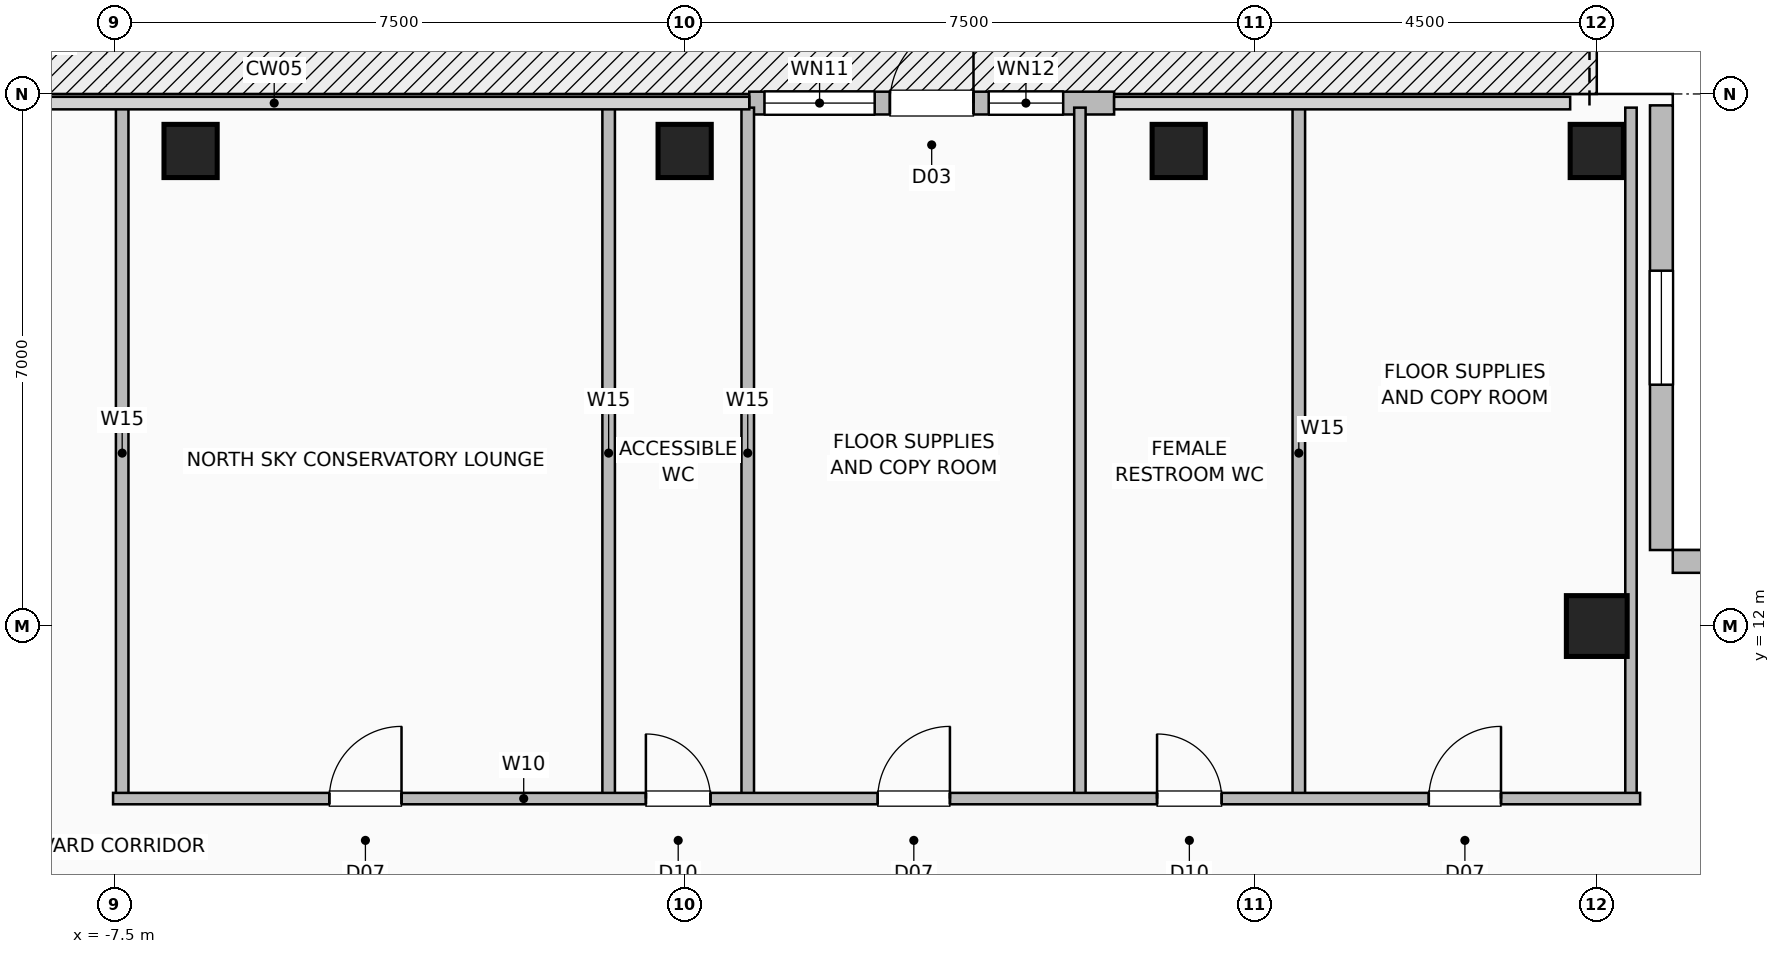
"""IFC4 building model, lengths in metres.
Left out: names, types, materials, properties, quantities, classifications, styles, units other than length and angle.
Written with IfcOpenShell. Run it as: python <this file> out.ifc"""

import sys

from ifc_helpers import new_model, si_unit, direction, frame, frame_2d, origin, origin_2d, place, context, subcontext, project, spatial, rectangle, hollow_rectangle, extrude, element, fill, save


model = new_model("IFC4")
c1 = context("Model", 3, precision=1e-05, world=origin(), true_north=direction((0.0, 1.0)))
c2 = subcontext(c1, "Body", "Model", "MODEL_VIEW")
j1 = project(units=[si_unit("LENGTHUNIT", "METRE"), si_unit("PLANEANGLEUNIT", "RADIAN")], contexts=[c1])
p1 = place(None, origin())
s1 = spatial("IfcSite", under=j1, at=p1, CompositionType="ELEMENT")
p2 = place(p1, origin())
s2 = spatial("IfcBuilding", under=s1, at=p2, CompositionType="ELEMENT")
p3 = place(p2, frame((0.0, 0.0, 264.8)))
s3 = spatial("IfcBuildingStorey", under=s2, at=p3, CompositionType="ELEMENT", Elevation=264.8)
for number, where, z_axis, x_axis in (
    (1, (-6.5, 18.25, 0.0), (0.0, 0.0, 1.0), (1.0, 0.0, 0.0)),
    (2, (0.0, 18.25, 0.0), (0.0, 0.0, 1.0), (1.0, 0.0, 0.0)),
    (3, (6.5, 18.25, 0.0), (0.0, 0.0, 1.0), (1.0, 0.0, 0.0)),
    (4, (12.0, 18.25, 0.0), (0.0, 0.0, 1.0), (1.0, 0.0, 0.0)),
):
    element("IfcColumn", number, at=place(p3, frame(where, z_axis=z_axis, x_axis=x_axis)), inside=s3, PredefinedType="COLUMN", context=c2, shape_type="SweptSolid", body=[
        extrude(hollow_rectangle(XDim=0.7, YDim=0.7, WallThickness=0.035, at=origin_2d()), origin(), (0.0, 0.0, 1.0), 3.6),
    ])
p4 = place(p3, frame((12.0, 12.0, 0.0), z_axis=(0.0, 0.0, 1.0), x_axis=(1.0, 0.0, 0.0)))
e5 = element("IfcColumn", 5, at=p4, inside=s3, PredefinedType="COLUMN", context=c2, shape_type="SweptSolid", body=[
    extrude(hollow_rectangle(XDim=0.8, YDim=0.8, WallThickness=0.04, at=origin_2d()), origin(), (0.0, 0.0, 1.0), 3.6),
])
p5 = place(p3, frame((0.85, 18.88, 0.0), z_axis=(0.0, 0.0, 1.0), x_axis=(1.0, 0.0, 0.0)))
e6 = element("IfcWall", 6, at=p5, inside=s3, PredefinedType="SOLIDWALL", context=c2, shape_type="SweptSolid", body=[
    extrude(rectangle(XDim=4.8, YDim=0.3, at=frame_2d((2.4, 0.0))), origin(), (0.0, 0.0, 1.0), 3.36),
])
p6 = place(p5, frame((1.85, 0.0, 0.0)))
e7 = element("IfcOpeningElement", 7, at=p6, cuts=e6, PredefinedType="OPENING", context=c2, shape_type="SweptSolid", body=[
    extrude(rectangle(XDim=1.1, YDim=2.2, at=frame_2d((0.55, 1.1))), frame((0.0, 0.16, 0.0), z_axis=(0.0, -1.0, 0.0), x_axis=(1.0, 0.0, 0.0)), (0.0, 0.0, 1.0), 0.32),
])
p7 = place(p5, frame((0.2, 0.0, 0.85)))
e8 = element("IfcOpeningElement", 8, at=p7, cuts=e6, PredefinedType="OPENING", context=c2, shape_type="SweptSolid", body=[
    extrude(rectangle(XDim=1.45, YDim=1.8, at=frame_2d((0.725, 0.9))), frame((0.0, 0.16, 0.0), z_axis=(0.0, -1.0, 0.0), x_axis=(1.0, 0.0, 0.0)), (0.0, 0.0, 1.0), 0.32),
])
p8 = place(p5, frame((3.15, 0.0, 0.85)))
e9 = element("IfcOpeningElement", 9, at=p8, cuts=e6, PredefinedType="OPENING", context=c2, shape_type="SweptSolid", body=[
    extrude(rectangle(XDim=0.98, YDim=1.8, at=frame_2d((0.49, 0.9))), frame((0.0, 0.16, 0.0), z_axis=(0.0, -1.0, 0.0), x_axis=(1.0, 0.0, 0.0)), (0.0, 0.0, 1.0), 0.32),
])
p9 = place(p3, frame((12.85, 18.85, 0.0), z_axis=(0.0, 0.0, 1.0), x_axis=(0.0, -1.0, 0.0)))
e10 = element("IfcWall", 10, at=p9, inside=s3, PredefinedType="SOLIDWALL", context=c2, shape_type="SweptSolid", body=[
    extrude(rectangle(XDim=5.85, YDim=0.3, at=frame_2d((2.925, 0.0))), origin(), (0.0, 0.0, 1.0), 3.36),
])
p10 = place(p9, frame((2.175, 0.0, 0.9)))
e11 = element("IfcOpeningElement", 11, at=p10, cuts=e10, PredefinedType="OPENING", context=c2, shape_type="SweptSolid", body=[
    extrude(rectangle(XDim=1.5, YDim=1.8, at=frame_2d((0.75, 0.9))), frame((0.0, 0.16, 0.0), z_axis=(0.0, -1.0, 0.0), x_axis=(1.0, 0.0, 0.0)), (0.0, 0.0, 1.0), 0.32),
])
p11 = place(p3, frame((18.85, 12.85, 0.0), z_axis=(0.0, 0.0, 1.0), x_axis=(-1.0, 0.0, 0.0)))
e12 = element("IfcWall", 12, at=p11, inside=s3, PredefinedType="SOLIDWALL", context=c2, shape_type="SweptSolid", body=[
    extrude(rectangle(XDim=5.85, YDim=0.3, at=frame_2d((2.925, 0.0))), origin(), (0.0, 0.0, 1.0), 3.36),
])
for number, where, z_axis, x_axis in (
    (13, (0.83, 9.73, 0.0), (0.0, 0.0, 1.0), (0.0, 1.0, 0.0)),
    (14, (8.08, 9.73, 0.0), (0.0, 0.0, 1.0), (0.0, 1.0, 0.0)),
    (15, (-7.4, 9.73, 0.0), (0.0, 0.0, 1.0), (0.0, 1.0, 0.0)),
    (16, (-1.0, 9.73, 0.0), (0.0, 0.0, 1.0), (0.0, 1.0, 0.0)),
):
    element("IfcWall", number, at=place(p3, frame(where, z_axis=z_axis, x_axis=x_axis)), inside=s3, PredefinedType="PLUMBINGWALL", context=c2, shape_type="SweptSolid", body=[
        extrude(rectangle(XDim=9.09, YDim=0.165, at=frame_2d((4.545, 0.0))), origin(), (0.0, 0.0, 1.0), 3.36),
    ])
for number, where, z_axis, x_axis in (
    (17, (5.2, 9.73, 0.0), (0.0, 0.0, 1.0), (0.0, 1.0, 0.0)),
    (18, (12.45, 9.73, 0.0), (0.0, 0.0, 1.0), (0.0, 1.0, 0.0)),
):
    element("IfcWall", number, at=place(p3, frame(where, z_axis=z_axis, x_axis=x_axis)), inside=s3, PredefinedType="PARTITIONING", context=c2, shape_type="SweptSolid", body=[
        extrude(rectangle(XDim=9.09, YDim=0.15, at=frame_2d((4.545, 0.0))), origin(), (0.0, 0.0, 1.0), 3.36),
    ])
p12 = place(p3, frame((-7.52, 9.73, 0.0), z_axis=(0.0, 0.0, 1.0), x_axis=(1.0, 0.0, 0.0)))
e19 = element("IfcWall", 19, at=p12, inside=s3, PredefinedType="PARTITIONING", context=c2, shape_type="SweptSolid", body=[
    extrude(rectangle(XDim=20.09, YDim=0.15, at=frame_2d((10.045, 0.0))), origin(), (0.0, 0.0, 1.0), 3.36),
])
p13 = place(p12, frame((2.845, 0.0, 0.0)))
e20 = element("IfcOpeningElement", 20, at=p13, cuts=e19, PredefinedType="OPENING", context=c2, shape_type="SweptSolid", body=[
    extrude(rectangle(XDim=0.95, YDim=2.06, at=frame_2d((0.475, 1.03))), frame((0.0, 0.085, 0.0), z_axis=(0.0, -1.0, 0.0), x_axis=(1.0, 0.0, 0.0)), (0.0, 0.0, 1.0), 0.17),
])
p14 = place(p12, frame((7.01, 0.0, 0.0)))
e21 = element("IfcOpeningElement", 21, at=p14, cuts=e19, PredefinedType="OPENING", context=c2, shape_type="SweptSolid", body=[
    extrude(rectangle(XDim=0.85, YDim=2.05, at=frame_2d((0.425, 1.025))), frame((0.0, 0.085, 0.0), z_axis=(0.0, -1.0, 0.0), x_axis=(1.0, 0.0, 0.0)), (0.0, 0.0, 1.0), 0.17),
])
p15 = place(p12, frame((10.06, 0.0, 0.0)))
e22 = element("IfcOpeningElement", 22, at=p15, cuts=e19, PredefinedType="OPENING", context=c2, shape_type="SweptSolid", body=[
    extrude(rectangle(XDim=0.95, YDim=2.06, at=frame_2d((0.475, 1.03))), frame((0.0, 0.085, 0.0), z_axis=(0.0, -1.0, 0.0), x_axis=(1.0, 0.0, 0.0)), (0.0, 0.0, 1.0), 0.17),
])
p16 = place(p12, frame((13.735, 0.0, 0.0)))
e23 = element("IfcOpeningElement", 23, at=p16, cuts=e19, PredefinedType="OPENING", context=c2, shape_type="SweptSolid", body=[
    extrude(rectangle(XDim=0.85, YDim=2.05, at=frame_2d((0.425, 1.025))), frame((0.0, 0.085, 0.0), z_axis=(0.0, -1.0, 0.0), x_axis=(1.0, 0.0, 0.0)), (0.0, 0.0, 1.0), 0.17),
])
p17 = place(p12, frame((17.31, 0.0, 0.0)))
e24 = element("IfcOpeningElement", 24, at=p17, cuts=e19, PredefinedType="OPENING", context=c2, shape_type="SweptSolid", body=[
    extrude(rectangle(XDim=0.95, YDim=2.06, at=frame_2d((0.475, 1.03))), frame((0.0, 0.085, 0.0), z_axis=(0.0, -1.0, 0.0), x_axis=(1.0, 0.0, 0.0)), (0.0, 0.0, 1.0), 0.17),
])
p18 = place(p6, origin())
e25 = element("IfcDoor", 25, at=p18, inside=s3, OperationType="SINGLE_SWING_RIGHT", PredefinedType="DOOR", context=c2, shape_type="SweptSolid", body=[
    extrude(rectangle(XDim=1.1, YDim=2.2, at=frame_2d((0.55, 1.1))), frame((0.0, 0.025, 0.0), z_axis=(0.0, -1.0, 0.0), x_axis=(1.0, 0.0, 0.0)), (0.0, 0.0, 1.0), 0.05),
])
fill(e7, e25)
p19 = place(p7, origin())
e26 = element("IfcWindow", 26, at=p19, inside=s3, PartitioningType="SINGLE_PANEL", PredefinedType="WINDOW", context=c2, shape_type="SweptSolid", body=[
    extrude(rectangle(XDim=1.45, YDim=1.8, at=frame_2d((0.725, 0.9))), frame((0.0, 0.03, 0.0), z_axis=(0.0, -1.0, 0.0), x_axis=(1.0, 0.0, 0.0)), (0.0, 0.0, 1.0), 0.06),
])
fill(e8, e26)
p20 = place(p8, origin())
e27 = element("IfcWindow", 27, at=p20, inside=s3, PartitioningType="SINGLE_PANEL", PredefinedType="WINDOW", context=c2, shape_type="SweptSolid", body=[
    extrude(rectangle(XDim=0.98, YDim=1.8, at=frame_2d((0.49, 0.9))), frame((0.0, 0.03, 0.0), z_axis=(0.0, -1.0, 0.0), x_axis=(1.0, 0.0, 0.0)), (0.0, 0.0, 1.0), 0.06),
])
fill(e9, e27)
p21 = place(p10, origin())
e28 = element("IfcWindow", 28, at=p21, inside=s3, PartitioningType="SINGLE_PANEL", PredefinedType="WINDOW", context=c2, shape_type="SweptSolid", body=[
    extrude(rectangle(XDim=1.5, YDim=1.8, at=frame_2d((0.75, 0.9))), frame((0.0, 0.03, 0.0), z_axis=(0.0, -1.0, 0.0), x_axis=(1.0, 0.0, 0.0)), (0.0, 0.0, 1.0), 0.06),
])
fill(e11, e28)
p22 = place(p13, origin())
e29 = element("IfcDoor", 29, at=p22, inside=s3, OperationType="SINGLE_SWING_RIGHT", PredefinedType="DOOR", context=c2, shape_type="SweptSolid", body=[
    extrude(rectangle(XDim=0.95, YDim=2.06, at=frame_2d((0.475, 1.03))), frame((0.0, 0.025, 0.0), z_axis=(0.0, -1.0, 0.0), x_axis=(1.0, 0.0, 0.0)), (0.0, 0.0, 1.0), 0.05),
])
fill(e20, e29)
p23 = place(p14, origin())
e30 = element("IfcDoor", 30, at=p23, inside=s3, OperationType="SINGLE_SWING_LEFT", PredefinedType="DOOR", context=c2, shape_type="SweptSolid", body=[
    extrude(rectangle(XDim=0.85, YDim=2.05, at=frame_2d((0.425, 1.025))), frame((0.0, 0.025, 0.0), z_axis=(0.0, -1.0, 0.0), x_axis=(1.0, 0.0, 0.0)), (0.0, 0.0, 1.0), 0.05),
])
fill(e21, e30)
p24 = place(p15, origin())
e31 = element("IfcDoor", 31, at=p24, inside=s3, OperationType="SINGLE_SWING_RIGHT", PredefinedType="DOOR", context=c2, shape_type="SweptSolid", body=[
    extrude(rectangle(XDim=0.95, YDim=2.06, at=frame_2d((0.475, 1.03))), frame((0.0, 0.025, 0.0), z_axis=(0.0, -1.0, 0.0), x_axis=(1.0, 0.0, 0.0)), (0.0, 0.0, 1.0), 0.05),
])
fill(e22, e31)
p25 = place(p16, origin())
e32 = element("IfcDoor", 32, at=p25, inside=s3, OperationType="SINGLE_SWING_LEFT", PredefinedType="DOOR", context=c2, shape_type="SweptSolid", body=[
    extrude(rectangle(XDim=0.85, YDim=2.05, at=frame_2d((0.425, 1.025))), frame((0.0, 0.025, 0.0), z_axis=(0.0, -1.0, 0.0), x_axis=(1.0, 0.0, 0.0)), (0.0, 0.0, 1.0), 0.05),
])
fill(e23, e32)
p26 = place(p17, origin())
e33 = element("IfcDoor", 33, at=p26, inside=s3, OperationType="SINGLE_SWING_RIGHT", PredefinedType="DOOR", context=c2, shape_type="SweptSolid", body=[
    extrude(rectangle(XDim=0.95, YDim=2.06, at=frame_2d((0.475, 1.03))), frame((0.0, 0.025, 0.0), z_axis=(0.0, -1.0, 0.0), x_axis=(1.0, 0.0, 0.0)), (0.0, 0.0, 1.0), 0.05),
])
fill(e24, e33)
save(model, sys.argv[1])
